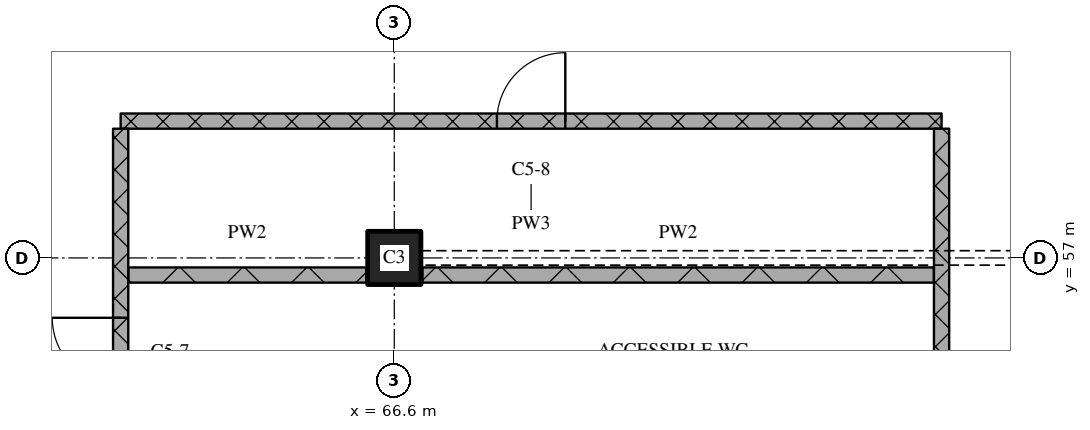
"""IFC4 building model, lengths in metres.
Left out: names, types, materials, properties, quantities, classifications, styles, units other than length and angle.
Written with IfcOpenShell. Run it as: python <this file> out.ifc"""

import sys

from ifc_helpers import new_model, si_unit, direction, frame, frame_2d, origin, origin_2d, place, context, subcontext, project, spatial, rectangle, extrude, element, fill, save


model = new_model("IFC4")
c1 = context("Model", 3, precision=1e-05, world=origin(), true_north=direction((0.0, 1.0)))
c2 = subcontext(c1, "Body", "Model", "MODEL_VIEW")
j1 = project(units=[si_unit("LENGTHUNIT", "METRE"), si_unit("PLANEANGLEUNIT", "RADIAN")], contexts=[c1])
p1 = place(None, origin())
s1 = spatial("IfcSite", under=j1, at=p1, CompositionType="ELEMENT")
p2 = place(p1, origin())
s2 = spatial("IfcBuilding", under=s1, at=p2, CompositionType="ELEMENT")
p3 = place(p2, frame((0.0, 0.0, 190.65)))
s3 = spatial("IfcBuildingStorey", under=s2, at=p3, CompositionType="ELEMENT", Elevation=190.65)
p4 = place(p3, frame((66.6, 57.0, 0.0), z_axis=(0.0, 0.0, 1.0), x_axis=(1.0, 0.0, 0.0)))
e1 = element("IfcColumn", 1, at=p4, inside=s3, PredefinedType="COLUMN", context=c2, shape_type="SweptSolid", body=[
    extrude(rectangle(XDim=0.7, YDim=0.7, at=origin_2d()), origin(), (0.0, 0.0, 1.0), 3.6),
])
p5 = place(p3, frame((63.1, 56.775, 0.0), z_axis=(0.0, 0.0, 1.0), x_axis=(1.0, 0.0, 0.0)))
e2 = element("IfcWall", 2, at=p5, inside=s3, PredefinedType="PARTITIONING", context=c2, shape_type="SweptSolid", body=[
    extrude(rectangle(XDim=3.13, YDim=0.2, at=frame_2d((1.565, 0.0))), origin(), (0.0, 0.0, 1.0), 3.3),
])
p6 = place(p3, frame((66.97, 56.775, 0.0), z_axis=(0.0, 0.0, 1.0), x_axis=(1.0, 0.0, 0.0)))
e3 = element("IfcWall", 3, at=p6, inside=s3, PredefinedType="PARTITIONING", context=c2, shape_type="SweptSolid", body=[
    extrude(rectangle(XDim=6.73, YDim=0.2, at=frame_2d((3.365, 0.0))), origin(), (0.0, 0.0, 1.0), 3.3),
])
p7 = place(p3, frame((73.8, 58.8, 0.0), z_axis=(0.0, 0.0, 1.0), x_axis=(-1.0, 0.0, 0.0)))
e4 = element("IfcWall", 4, at=p7, inside=s3, PredefinedType="PARTITIONING", context=c2, shape_type="SweptSolid", body=[
    extrude(rectangle(XDim=10.8, YDim=0.2, at=frame_2d((5.4, 0.0))), origin(), (0.0, 0.0, 1.0), 3.3),
])
p8 = place(p7, frame((4.95, 0.0, 0.0)))
e5 = element("IfcOpeningElement", 5, at=p8, cuts=e4, PredefinedType="OPENING", context=c2, shape_type="SweptSolid", body=[
    extrude(rectangle(XDim=0.9, YDim=2.1, at=frame_2d((0.45, 1.05))), frame((0.0, 0.11, 0.0), z_axis=(0.0, -1.0, 0.0), x_axis=(1.0, 0.0, 0.0)), (0.0, 0.0, 1.0), 0.22),
])
p9 = place(p3, frame((63.0, 58.7, 0.0), z_axis=(0.0, 0.0, 1.0), x_axis=(0.0, -1.0, 0.0)))
e6 = element("IfcWall", 6, at=p9, inside=s3, PredefinedType="PARTITIONING", context=c2, shape_type="SweptSolid", body=[
    extrude(rectangle(XDim=15.4, YDim=0.2, at=frame_2d((7.7, 0.0))), origin(), (0.0, 0.0, 1.0), 3.3),
])
p10 = place(p9, frame((2.488, 0.0, 0.0)))
e7 = element("IfcOpeningElement", 7, at=p10, cuts=e6, PredefinedType="OPENING", context=c2, shape_type="SweptSolid", body=[
    extrude(rectangle(XDim=0.9, YDim=2.1, at=frame_2d((0.45, 1.05))), frame((0.0, 0.11, 0.0), z_axis=(0.0, -1.0, 0.0), x_axis=(1.0, 0.0, 0.0)), (0.0, 0.0, 1.0), 0.22),
])
p11 = place(p9, frame((4.512, 0.0, 0.0)))
e8 = element("IfcOpeningElement", 8, at=p11, cuts=e6, PredefinedType="OPENING", context=c2, shape_type="SweptSolid", body=[
    extrude(rectangle(XDim=0.9, YDim=2.1, at=frame_2d((0.45, 1.05))), frame((0.0, 0.11, 0.0), z_axis=(0.0, -1.0, 0.0), x_axis=(1.0, 0.0, 0.0)), (0.0, 0.0, 1.0), 0.22),
])
p12 = place(p9, frame((6.538, 0.0, 0.0)))
e9 = element("IfcOpeningElement", 9, at=p12, cuts=e6, PredefinedType="OPENING", context=c2, shape_type="SweptSolid", body=[
    extrude(rectangle(XDim=0.9, YDim=2.1, at=frame_2d((0.45, 1.05))), frame((0.0, 0.11, 0.0), z_axis=(0.0, -1.0, 0.0), x_axis=(1.0, 0.0, 0.0)), (0.0, 0.0, 1.0), 0.22),
])
p13 = place(p9, frame((11.25, 0.0, 0.0)))
e10 = element("IfcOpeningElement", 10, at=p13, cuts=e6, PredefinedType="OPENING", context=c2, shape_type="SweptSolid", body=[
    extrude(rectangle(XDim=0.9, YDim=2.1, at=frame_2d((0.45, 1.05))), frame((0.0, 0.11, 0.0), z_axis=(0.0, -1.0, 0.0), x_axis=(1.0, 0.0, 0.0)), (0.0, 0.0, 1.0), 0.22),
])
p14 = place(p3, frame((73.8, 58.7, 0.0), z_axis=(0.0, 0.0, 1.0), x_axis=(0.0, -1.0, 0.0)))
e11 = element("IfcWall", 11, at=p14, inside=s3, PredefinedType="PARTITIONING", context=c2, shape_type="SweptSolid", body=[
    extrude(rectangle(XDim=8.0, YDim=0.2, at=frame_2d((4.0, 0.0))), origin(), (0.0, 0.0, 1.0), 3.3),
])
p15 = place(p8, origin())
e12 = element("IfcDoor", 12, at=p15, inside=s3, OperationType="SINGLE_SWING_RIGHT", PredefinedType="DOOR", context=c2, shape_type="SweptSolid", body=[
    extrude(rectangle(XDim=0.9, YDim=2.1, at=frame_2d((0.45, 1.05))), frame((0.0, 0.025, 0.0), z_axis=(0.0, -1.0, 0.0), x_axis=(1.0, 0.0, 0.0)), (0.0, 0.0, 1.0), 0.05),
])
fill(e5, e12)
p16 = place(p10, origin())
e13 = element("IfcDoor", 13, at=p16, inside=s3, OperationType="SINGLE_SWING_RIGHT", PredefinedType="DOOR", context=c2, shape_type="SweptSolid", body=[
    extrude(rectangle(XDim=0.9, YDim=2.1, at=frame_2d((0.45, 1.05))), frame((0.0, 0.025, 0.0), z_axis=(0.0, -1.0, 0.0), x_axis=(1.0, 0.0, 0.0)), (0.0, 0.0, 1.0), 0.05),
])
fill(e7, e13)
save(model, sys.argv[1])
